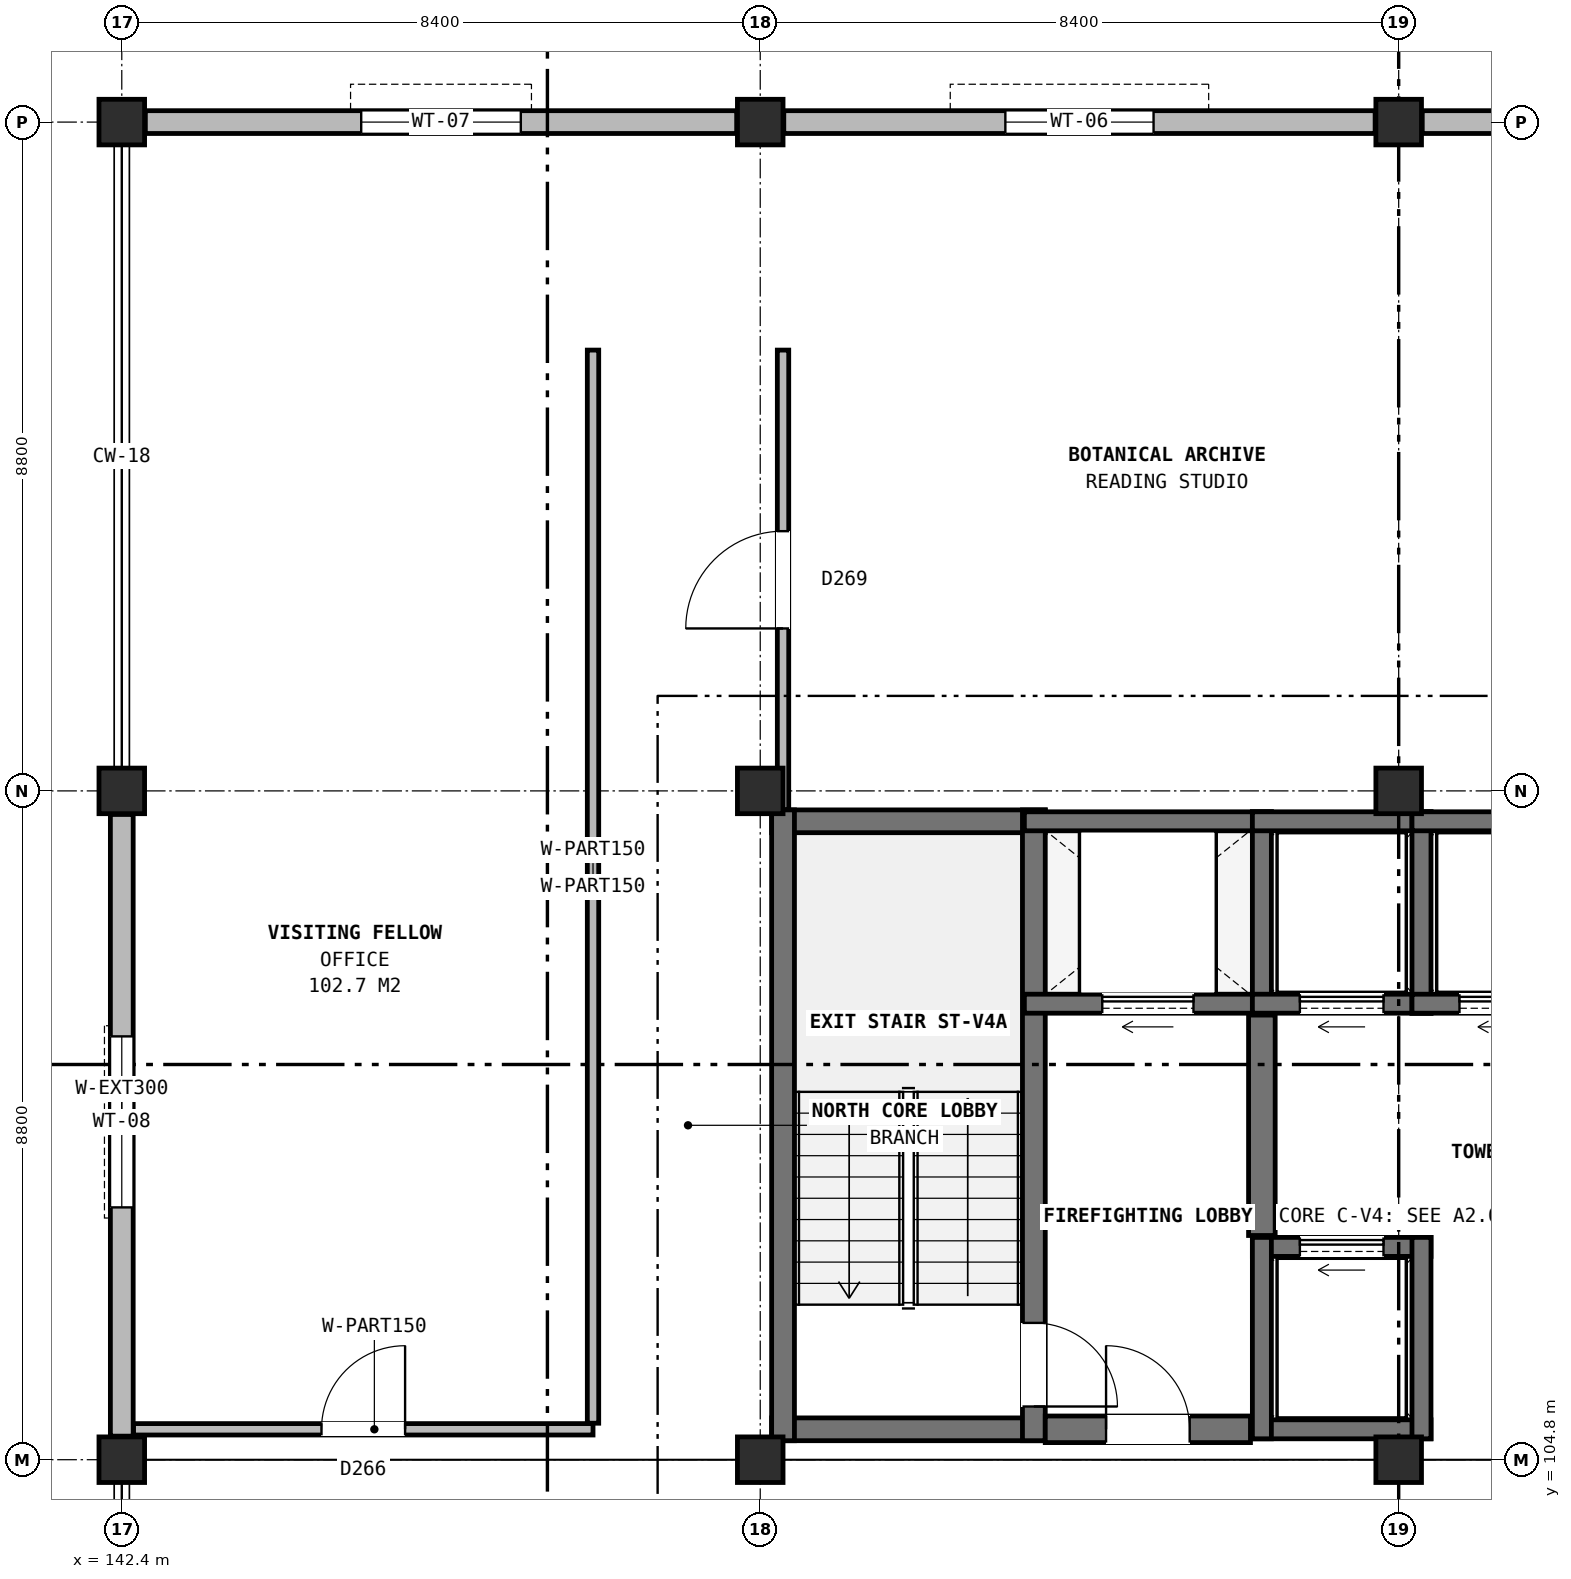
"""IFC4 building model, lengths in metres.
Left out: names, types, materials, properties, quantities, classifications, styles, units other than length and angle.
Written with IfcOpenShell. Run it as: python <this file> out.ifc"""

import sys

from ifc_helpers import new_model, si_unit, direction, frame, frame_2d, origin, origin_2d, place, context, subcontext, project, spatial, rectangle, extrude, element, fill, save


model = new_model("IFC4")
c1 = context("Model", 3, precision=1e-05, world=origin(), true_north=direction((0.0, 1.0)))
c2 = subcontext(c1, "Body", "Model", "MODEL_VIEW")
j1 = project(units=[si_unit("LENGTHUNIT", "METRE"), si_unit("PLANEANGLEUNIT", "RADIAN")], contexts=[c1])
p1 = place(None, origin())
s1 = spatial("IfcSite", under=j1, at=p1, CompositionType="ELEMENT")
p2 = place(p1, origin())
s2 = spatial("IfcBuilding", under=s1, at=p2, CompositionType="ELEMENT")
p3 = place(p2, frame((0.0, 0.0, 52.2)))
s3 = spatial("IfcBuildingStorey", under=s2, at=p3, CompositionType="ELEMENT", Elevation=52.2)
for number, where, z_axis, x_axis in (
    (1, (142.4, 104.8, 0.0), (0.0, 0.0, 1.0), (1.0, 0.0, 0.0)),
    (2, (142.4, 113.6, 0.0), (0.0, 0.0, 1.0), (1.0, 0.0, 0.0)),
    (3, (142.4, 122.4, 0.0), (0.0, 0.0, 1.0), (1.0, 0.0, 0.0)),
    (4, (150.8, 104.8, 0.0), (0.0, 0.0, 1.0), (1.0, 0.0, 0.0)),
    (5, (150.8, 113.6, 0.0), (0.0, 0.0, 1.0), (1.0, 0.0, 0.0)),
    (6, (150.8, 122.4, 0.0), (0.0, 0.0, 1.0), (1.0, 0.0, 0.0)),
    (7, (159.2, 104.8, 0.0), (0.0, 0.0, 1.0), (1.0, 0.0, 0.0)),
    (8, (159.2, 113.6, 0.0), (0.0, 0.0, 1.0), (1.0, 0.0, 0.0)),
    (9, (159.2, 122.4, 0.0), (0.0, 0.0, 1.0), (1.0, 0.0, 0.0)),
):
    element("IfcColumn", number, at=place(p3, frame(where, z_axis=z_axis, x_axis=x_axis)), inside=s3, PredefinedType="COLUMN", context=c2, shape_type="SweptSolid", body=[
        extrude(rectangle(XDim=0.6, YDim=0.6, at=origin_2d()), origin(), (0.0, 0.0, 1.0), 3.8),
    ])
p4 = place(p3, frame((167.29, 122.4, 0.0), z_axis=(0.0, 0.0, 1.0), x_axis=(-1.0, 0.0, 0.0)))
e10 = element("IfcWall", 10, at=p4, inside=s3, PredefinedType="SOLIDWALL", context=c2, shape_type="SweptSolid", body=[
    extrude(rectangle(XDim=7.78, YDim=0.3, at=frame_2d((3.89, 0.0))), origin(), (0.0, 0.0, 1.0), 3.05),
])
p5 = place(p4, frame((3.035, 0.0, 0.9)))
e11 = element("IfcOpeningElement", 11, at=p5, cuts=e10, PredefinedType="OPENING", context=c2, shape_type="SweptSolid", body=[
    extrude(rectangle(XDim=1.8, YDim=1.9, at=frame_2d((0.9, 0.95))), frame((0.0, 0.16, 0.0), z_axis=(0.0, -1.0, 0.0), x_axis=(1.0, 0.0, 0.0)), (0.0, 0.0, 1.0), 0.32),
])
p6 = place(p3, frame((158.89, 122.4, 0.0), z_axis=(0.0, 0.0, 1.0), x_axis=(-1.0, 0.0, 0.0)))
e12 = element("IfcWall", 12, at=p6, inside=s3, PredefinedType="SOLIDWALL", context=c2, shape_type="SweptSolid", body=[
    extrude(rectangle(XDim=7.78, YDim=0.3, at=frame_2d((3.89, 0.0))), origin(), (0.0, 0.0, 1.0), 3.05),
])
p7 = place(p6, frame((2.915, 0.0, 0.9)))
e13 = element("IfcOpeningElement", 13, at=p7, cuts=e12, PredefinedType="OPENING", context=c2, shape_type="SweptSolid", body=[
    extrude(rectangle(XDim=1.95, YDim=1.9, at=frame_2d((0.975, 0.95))), frame((0.0, 0.16, 0.0), z_axis=(0.0, -1.0, 0.0), x_axis=(1.0, 0.0, 0.0)), (0.0, 0.0, 1.0), 0.32),
])
p8 = place(p3, frame((150.49, 122.4, 0.0), z_axis=(0.0, 0.0, 1.0), x_axis=(-1.0, 0.0, 0.0)))
e14 = element("IfcWall", 14, at=p8, inside=s3, PredefinedType="SOLIDWALL", context=c2, shape_type="SweptSolid", body=[
    extrude(rectangle(XDim=7.78, YDim=0.3, at=frame_2d((3.89, 0.0))), origin(), (0.0, 0.0, 1.0), 3.05),
])
p9 = place(p8, frame((2.84, 0.0, 0.9)))
e15 = element("IfcOpeningElement", 15, at=p9, cuts=e14, PredefinedType="OPENING", context=c2, shape_type="SweptSolid", body=[
    extrude(rectangle(XDim=2.1, YDim=1.95, at=frame_2d((1.05, 0.975))), frame((0.0, 0.16, 0.0), z_axis=(0.0, -1.0, 0.0), x_axis=(1.0, 0.0, 0.0)), (0.0, 0.0, 1.0), 0.32),
])
p10 = place(p3, frame((142.4, 113.29, 0.0), z_axis=(0.0, 0.0, 1.0), x_axis=(0.0, -1.0, 0.0)))
e16 = element("IfcWall", 16, at=p10, inside=s3, PredefinedType="SOLIDWALL", context=c2, shape_type="SweptSolid", body=[
    extrude(rectangle(XDim=8.18, YDim=0.3, at=frame_2d((4.09, 0.0))), origin(), (0.0, 0.0, 1.0), 3.05),
])
p11 = place(p10, frame((2.92, 0.0, 0.9)))
e17 = element("IfcOpeningElement", 17, at=p11, cuts=e16, PredefinedType="OPENING", context=c2, shape_type="SweptSolid", body=[
    extrude(rectangle(XDim=2.25, YDim=1.95, at=frame_2d((1.125, 0.975))), frame((0.0, 0.16, 0.0), z_axis=(0.0, -1.0, 0.0), x_axis=(1.0, 0.0, 0.0)), (0.0, 0.0, 1.0), 0.32),
])
for number, where, z_axis, x_axis in (
    (18, (150.95, 105.2, 0.0), (0.0, 0.0, 1.0), (1.0, 0.0, 0.0)),
    (19, (150.95, 113.2, 0.0), (0.0, 0.0, 1.0), (1.0, 0.0, 0.0)),
):
    element("IfcWall", number, at=place(p3, frame(where, z_axis=z_axis, x_axis=x_axis)), inside=s3, PredefinedType="SHEAR", context=c2, shape_type="SweptSolid", body=[
        extrude(rectangle(XDim=3.6, YDim=0.3, at=frame_2d((1.8, 0.0))), origin(), (0.0, 0.0, 1.0), 3.8),
    ])
p12 = place(p3, frame((151.1, 105.05, 0.0), z_axis=(0.0, 0.0, 1.0), x_axis=(0.0, 1.0, 0.0)))
e20 = element("IfcWall", 20, at=p12, inside=s3, PredefinedType="SHEAR", context=c2, shape_type="SweptSolid", body=[
    extrude(rectangle(XDim=8.3, YDim=0.3, at=frame_2d((4.15, 0.0))), origin(), (0.0, 0.0, 1.0), 3.8),
])
p13 = place(p3, frame((154.4, 105.05, 0.0), z_axis=(0.0, 0.0, 1.0), x_axis=(0.0, 1.0, 0.0)))
e21 = element("IfcWall", 21, at=p13, inside=s3, PredefinedType="SHEAR", context=c2, shape_type="SweptSolid", body=[
    extrude(rectangle(XDim=8.3, YDim=0.3, at=frame_2d((4.15, 0.0))), origin(), (0.0, 0.0, 1.0), 3.8),
])
p14 = place(p13, frame((0.45, 0.0, 0.0)))
e22 = element("IfcOpeningElement", 22, at=p14, cuts=e21, PredefinedType="OPENING", context=c2, shape_type="SweptSolid", body=[
    extrude(rectangle(XDim=1.1, YDim=2.2, at=frame_2d((0.55, 1.1))), frame((0.0, 0.16, 0.0), z_axis=(0.0, -1.0, 0.0), x_axis=(1.0, 0.0, 0.0)), (0.0, 0.0, 1.0), 0.32),
])
p15 = place(p3, frame((154.275, 110.8, 0.0), z_axis=(0.0, 0.0, 1.0), x_axis=(1.0, 0.0, 0.0)))
e23 = element("IfcWall", 23, at=p15, inside=s3, PredefinedType="SOLIDWALL", context=c2, shape_type="SweptSolid", body=[
    extrude(rectangle(XDim=3.25, YDim=0.25, at=frame_2d((1.625, 0.0))), origin(), (0.0, 0.0, 1.0), 3.48),
])
p16 = place(p15, frame((1.025, 0.0, 0.0)))
e24 = element("IfcOpeningElement", 24, at=p16, cuts=e23, PredefinedType="OPENING", context=c2, shape_type="SweptSolid", body=[
    extrude(rectangle(XDim=1.2, YDim=2.2, at=frame_2d((0.6, 1.1))), frame((0.0, 0.135, 0.0), z_axis=(0.0, -1.0, 0.0), x_axis=(1.0, 0.0, 0.0)), (0.0, 0.0, 1.0), 0.27),
])
p17 = place(p3, frame((154.275, 113.2, 0.0), z_axis=(0.0, 0.0, 1.0), x_axis=(1.0, 0.0, 0.0)))
e25 = element("IfcWall", 25, at=p17, inside=s3, PredefinedType="SOLIDWALL", context=c2, shape_type="SweptSolid", body=[
    extrude(rectangle(XDim=3.25, YDim=0.25, at=frame_2d((1.625, 0.0))), origin(), (0.0, 0.0, 1.0), 3.48),
])
p18 = place(p3, frame((157.4, 110.675, 0.0), z_axis=(0.0, 0.0, 1.0), x_axis=(0.0, 1.0, 0.0)))
e26 = element("IfcWall", 26, at=p18, inside=s3, PredefinedType="SOLIDWALL", context=c2, shape_type="SweptSolid", body=[
    extrude(rectangle(XDim=2.65, YDim=0.25, at=frame_2d((1.325, 0.0))), origin(), (0.0, 0.0, 1.0), 3.48),
])
p19 = place(p3, frame((157.275, 110.8, 0.0), z_axis=(0.0, 0.0, 1.0), x_axis=(1.0, 0.0, 0.0)))
e27 = element("IfcWall", 27, at=p19, inside=s3, PredefinedType="SOLIDWALL", context=c2, shape_type="SweptSolid", body=[
    extrude(rectangle(XDim=2.35, YDim=0.25, at=frame_2d((1.175, 0.0))), origin(), (0.0, 0.0, 1.0), 3.48),
])
p20 = place(p19, frame((0.625, 0.0, 0.0)))
e28 = element("IfcOpeningElement", 28, at=p20, cuts=e27, PredefinedType="OPENING", context=c2, shape_type="SweptSolid", body=[
    extrude(rectangle(XDim=1.1, YDim=2.2, at=frame_2d((0.55, 1.1))), frame((0.0, 0.135, 0.0), z_axis=(0.0, -1.0, 0.0), x_axis=(1.0, 0.0, 0.0)), (0.0, 0.0, 1.0), 0.27),
])
p21 = place(p3, frame((157.275, 113.2, 0.0), z_axis=(0.0, 0.0, 1.0), x_axis=(1.0, 0.0, 0.0)))
e29 = element("IfcWall", 29, at=p21, inside=s3, PredefinedType="SOLIDWALL", context=c2, shape_type="SweptSolid", body=[
    extrude(rectangle(XDim=2.35, YDim=0.25, at=frame_2d((1.175, 0.0))), origin(), (0.0, 0.0, 1.0), 3.48),
])
p22 = place(p3, frame((159.5, 110.675, 0.0), z_axis=(0.0, 0.0, 1.0), x_axis=(0.0, 1.0, 0.0)))
e30 = element("IfcWall", 30, at=p22, inside=s3, PredefinedType="SOLIDWALL", context=c2, shape_type="SweptSolid", body=[
    extrude(rectangle(XDim=2.65, YDim=0.25, at=frame_2d((1.325, 0.0))), origin(), (0.0, 0.0, 1.0), 3.48),
])
p23 = place(p3, frame((159.375, 110.8, 0.0), z_axis=(0.0, 0.0, 1.0), x_axis=(1.0, 0.0, 0.0)))
e31 = element("IfcWall", 31, at=p23, inside=s3, PredefinedType="SOLIDWALL", context=c2, shape_type="SweptSolid", body=[
    extrude(rectangle(XDim=2.35, YDim=0.25, at=frame_2d((1.175, 0.0))), origin(), (0.0, 0.0, 1.0), 3.48),
])
p24 = place(p23, frame((0.625, 0.0, 0.0)))
e32 = element("IfcOpeningElement", 32, at=p24, cuts=e31, PredefinedType="OPENING", context=c2, shape_type="SweptSolid", body=[
    extrude(rectangle(XDim=1.1, YDim=2.2, at=frame_2d((0.55, 1.1))), frame((0.0, 0.135, 0.0), z_axis=(0.0, -1.0, 0.0), x_axis=(1.0, 0.0, 0.0)), (0.0, 0.0, 1.0), 0.27),
])
for number, where, z_axis, x_axis in (
    (33, (159.375, 113.2, 0.0), (0.0, 0.0, 1.0), (1.0, 0.0, 0.0)),
    (34, (157.275, 105.2, 0.0), (0.0, 0.0, 1.0), (1.0, 0.0, 0.0)),
):
    element("IfcWall", number, at=place(p3, frame(where, z_axis=z_axis, x_axis=x_axis)), inside=s3, PredefinedType="SOLIDWALL", context=c2, shape_type="SweptSolid", body=[
        extrude(rectangle(XDim=2.35, YDim=0.25, at=frame_2d((1.175, 0.0))), origin(), (0.0, 0.0, 1.0), 3.48),
    ])
p25 = place(p3, frame((157.275, 107.6, 0.0), z_axis=(0.0, 0.0, 1.0), x_axis=(1.0, 0.0, 0.0)))
e35 = element("IfcWall", 35, at=p25, inside=s3, PredefinedType="SOLIDWALL", context=c2, shape_type="SweptSolid", body=[
    extrude(rectangle(XDim=2.35, YDim=0.25, at=frame_2d((1.175, 0.0))), origin(), (0.0, 0.0, 1.0), 3.48),
])
p26 = place(p25, frame((0.625, 0.0, 0.0)))
e36 = element("IfcOpeningElement", 36, at=p26, cuts=e35, PredefinedType="OPENING", context=c2, shape_type="SweptSolid", body=[
    extrude(rectangle(XDim=1.1, YDim=2.2, at=frame_2d((0.55, 1.1))), frame((0.0, 0.135, 0.0), z_axis=(0.0, -1.0, 0.0), x_axis=(1.0, 0.0, 0.0)), (0.0, 0.0, 1.0), 0.27),
])
for number, where, z_axis, x_axis in (
    (37, (157.4, 105.075, 0.0), (0.0, 0.0, 1.0), (0.0, 1.0, 0.0)),
    (38, (159.5, 105.075, 0.0), (0.0, 0.0, 1.0), (0.0, 1.0, 0.0)),
):
    element("IfcWall", number, at=place(p3, frame(where, z_axis=z_axis, x_axis=x_axis)), inside=s3, PredefinedType="SOLIDWALL", context=c2, shape_type="SweptSolid", body=[
        extrude(rectangle(XDim=2.65, YDim=0.25, at=frame_2d((1.325, 0.0))), origin(), (0.0, 0.0, 1.0), 3.48),
    ])
p27 = place(p3, frame((157.4, 107.75, 0.0), z_axis=(0.0, 0.0, 1.0), x_axis=(0.0, 1.0, 0.0)))
e39 = element("IfcWall", 39, at=p27, inside=s3, PredefinedType="SHEAR", context=c2, shape_type="SweptSolid", body=[
    extrude(rectangle(XDim=2.9, YDim=0.35, at=frame_2d((1.45, 0.0))), origin(), (0.0, 0.0, 1.0), 3.48),
])
p28 = place(p3, frame((154.55, 105.2, 0.0), z_axis=(0.0, 0.0, 1.0), x_axis=(1.0, 0.0, 0.0)))
e40 = element("IfcWall", 40, at=p28, inside=s3, PredefinedType="SHEAR", context=c2, shape_type="SweptSolid", body=[
    extrude(rectangle(XDim=2.7, YDim=0.35, at=frame_2d((1.35, 0.0))), origin(), (0.0, 0.0, 1.0), 3.48),
])
p29 = place(p28, frame((0.8, 0.0, 0.0)))
e41 = element("IfcOpeningElement", 41, at=p29, cuts=e40, PredefinedType="OPENING", context=c2, shape_type="SweptSolid", body=[
    extrude(rectangle(XDim=1.1, YDim=2.2, at=frame_2d((0.55, 1.1))), frame((0.0, 0.185, 0.0), z_axis=(0.0, -1.0, 0.0), x_axis=(1.0, 0.0, 0.0)), (0.0, 0.0, 1.0), 0.37),
])
p30 = place(p3, frame((142.555, 105.2, 0.0), z_axis=(0.0, 0.0, 1.0), x_axis=(1.0, 0.0, 0.0)))
e42 = element("IfcWall", 42, at=p30, inside=s3, PredefinedType="PARTITIONING", context=c2, shape_type="SweptSolid", body=[
    extrude(rectangle(XDim=6.045, YDim=0.15, at=frame_2d((3.022, 0.0))), origin(), (0.0, 0.0, 1.0), 3.045),
])
p31 = place(p30, frame((2.472, 0.0, 0.0)))
e43 = element("IfcOpeningElement", 43, at=p31, cuts=e42, PredefinedType="OPENING", context=c2, shape_type="SweptSolid", body=[
    extrude(rectangle(XDim=1.1, YDim=2.15, at=frame_2d((0.55, 1.075))), frame((0.0, 0.085, 0.0), z_axis=(0.0, -1.0, 0.0), x_axis=(1.0, 0.0, 0.0)), (0.0, 0.0, 1.0), 0.17),
])
p32 = place(p3, frame((148.6, 105.28, 0.0), z_axis=(0.0, 0.0, 1.0), x_axis=(0.0, 1.0, 0.0)))
e44 = element("IfcWall", 44, at=p32, inside=s3, PredefinedType="PARTITIONING", context=c2, shape_type="SweptSolid", body=[
    extrude(rectangle(XDim=14.12, YDim=0.15, at=frame_2d((7.06, 0.0))), origin(), (0.0, 0.0, 1.0), 3.465),
])
p33 = place(p3, frame((151.1, 113.355, 0.0), z_axis=(0.0, 0.0, 1.0), x_axis=(0.0, 1.0, 0.0)))
e45 = element("IfcWall", 45, at=p33, inside=s3, PredefinedType="PARTITIONING", context=c2, shape_type="SweptSolid", body=[
    extrude(rectangle(XDim=6.045, YDim=0.15, at=frame_2d((3.022, 0.0))), origin(), (0.0, 0.0, 1.0), 3.045),
])
p34 = place(p33, frame((2.383, 0.0, 0.0)))
e46 = element("IfcOpeningElement", 46, at=p34, cuts=e45, PredefinedType="OPENING", context=c2, shape_type="SweptSolid", body=[
    extrude(rectangle(XDim=1.28, YDim=2.25, at=frame_2d((0.64, 1.125))), frame((0.0, 0.085, 0.0), z_axis=(0.0, -1.0, 0.0), x_axis=(1.0, 0.0, 0.0)), (0.0, 0.0, 1.0), 0.17),
])
p35 = place(p7, origin())
e47 = element("IfcWindow", 47, at=p35, inside=s3, PartitioningType="SINGLE_PANEL", PredefinedType="WINDOW", context=c2, shape_type="SweptSolid", body=[
    extrude(rectangle(XDim=1.95, YDim=1.9, at=frame_2d((0.975, 0.95))), frame((0.0, 0.03, 0.0), z_axis=(0.0, -1.0, 0.0), x_axis=(1.0, 0.0, 0.0)), (0.0, 0.0, 1.0), 0.06),
])
fill(e13, e47)
p36 = place(p9, origin())
e48 = element("IfcWindow", 48, at=p36, inside=s3, PartitioningType="SINGLE_PANEL", PredefinedType="WINDOW", context=c2, shape_type="SweptSolid", body=[
    extrude(rectangle(XDim=2.1, YDim=1.95, at=frame_2d((1.05, 0.975))), frame((0.0, 0.03, 0.0), z_axis=(0.0, -1.0, 0.0), x_axis=(1.0, 0.0, 0.0)), (0.0, 0.0, 1.0), 0.06),
])
fill(e15, e48)
p37 = place(p11, origin())
e49 = element("IfcWindow", 49, at=p37, inside=s3, PartitioningType="SINGLE_PANEL", PredefinedType="WINDOW", context=c2, shape_type="SweptSolid", body=[
    extrude(rectangle(XDim=2.25, YDim=1.95, at=frame_2d((1.125, 0.975))), frame((0.0, 0.03, 0.0), z_axis=(0.0, -1.0, 0.0), x_axis=(1.0, 0.0, 0.0)), (0.0, 0.0, 1.0), 0.06),
])
fill(e17, e49)
p38 = place(p14, frame((1.1, 0.0, 0.0), z_axis=(0.0, 0.0, 1.0), x_axis=(-1.0, 0.0, 0.0)))
e50 = element("IfcDoor", 50, at=p38, inside=s3, OperationType="SINGLE_SWING_LEFT", PredefinedType="DOOR", context=c2, shape_type="SweptSolid", body=[
    extrude(rectangle(XDim=1.1, YDim=2.2, at=frame_2d((0.55, 1.1))), frame((0.0, 0.025, 0.0), z_axis=(0.0, -1.0, 0.0), x_axis=(1.0, 0.0, 0.0)), (0.0, 0.0, 1.0), 0.05),
])
fill(e22, e50)
p39 = place(p16, origin())
e51 = element("IfcDoor", 51, at=p39, inside=s3, OperationType="SLIDING_TO_LEFT", PredefinedType="DOOR", context=c2, shape_type="SweptSolid", body=[
    extrude(rectangle(XDim=1.2, YDim=2.2, at=frame_2d((0.6, 1.1))), frame((0.0, 0.025, 0.0), z_axis=(0.0, -1.0, 0.0), x_axis=(1.0, 0.0, 0.0)), (0.0, 0.0, 1.0), 0.05),
])
fill(e24, e51)
p40 = place(p20, origin())
e52 = element("IfcDoor", 52, at=p40, inside=s3, OperationType="SLIDING_TO_LEFT", PredefinedType="DOOR", context=c2, shape_type="SweptSolid", body=[
    extrude(rectangle(XDim=1.1, YDim=2.2, at=frame_2d((0.55, 1.1))), frame((0.0, 0.025, 0.0), z_axis=(0.0, -1.0, 0.0), x_axis=(1.0, 0.0, 0.0)), (0.0, 0.0, 1.0), 0.05),
])
fill(e28, e52)
p41 = place(p24, origin())
e53 = element("IfcDoor", 53, at=p41, inside=s3, OperationType="SLIDING_TO_LEFT", PredefinedType="DOOR", context=c2, shape_type="SweptSolid", body=[
    extrude(rectangle(XDim=1.1, YDim=2.2, at=frame_2d((0.55, 1.1))), frame((0.0, 0.025, 0.0), z_axis=(0.0, -1.0, 0.0), x_axis=(1.0, 0.0, 0.0)), (0.0, 0.0, 1.0), 0.05),
])
fill(e32, e53)
p42 = place(p26, origin())
e54 = element("IfcDoor", 54, at=p42, inside=s3, OperationType="SLIDING_TO_LEFT", PredefinedType="DOOR", context=c2, shape_type="SweptSolid", body=[
    extrude(rectangle(XDim=1.1, YDim=2.2, at=frame_2d((0.55, 1.1))), frame((0.0, 0.025, 0.0), z_axis=(0.0, -1.0, 0.0), x_axis=(1.0, 0.0, 0.0)), (0.0, 0.0, 1.0), 0.05),
])
fill(e36, e54)
p43 = place(p29, origin())
e55 = element("IfcDoor", 55, at=p43, inside=s3, OperationType="SINGLE_SWING_LEFT", PredefinedType="DOOR", context=c2, shape_type="SweptSolid", body=[
    extrude(rectangle(XDim=1.1, YDim=2.2, at=frame_2d((0.55, 1.1))), frame((0.0, 0.025, 0.0), z_axis=(0.0, -1.0, 0.0), x_axis=(1.0, 0.0, 0.0)), (0.0, 0.0, 1.0), 0.05),
])
fill(e41, e55)
p44 = place(p31, origin())
e56 = element("IfcDoor", 56, at=p44, inside=s3, OperationType="SINGLE_SWING_RIGHT", PredefinedType="DOOR", context=c2, shape_type="SweptSolid", body=[
    extrude(rectangle(XDim=1.1, YDim=2.15, at=frame_2d((0.55, 1.075))), frame((0.0, 0.025, 0.0), z_axis=(0.0, -1.0, 0.0), x_axis=(1.0, 0.0, 0.0)), (0.0, 0.0, 1.0), 0.05),
])
fill(e43, e56)
p45 = place(p34, origin())
e57 = element("IfcDoor", 57, at=p45, inside=s3, OperationType="SINGLE_SWING_LEFT", PredefinedType="DOOR", context=c2, shape_type="SweptSolid", body=[
    extrude(rectangle(XDim=1.28, YDim=2.25, at=frame_2d((0.64, 1.125))), frame((0.0, 0.025, 0.0), z_axis=(0.0, -1.0, 0.0), x_axis=(1.0, 0.0, 0.0)), (0.0, 0.0, 1.0), 0.05),
])
fill(e46, e57)
save(model, sys.argv[1])
